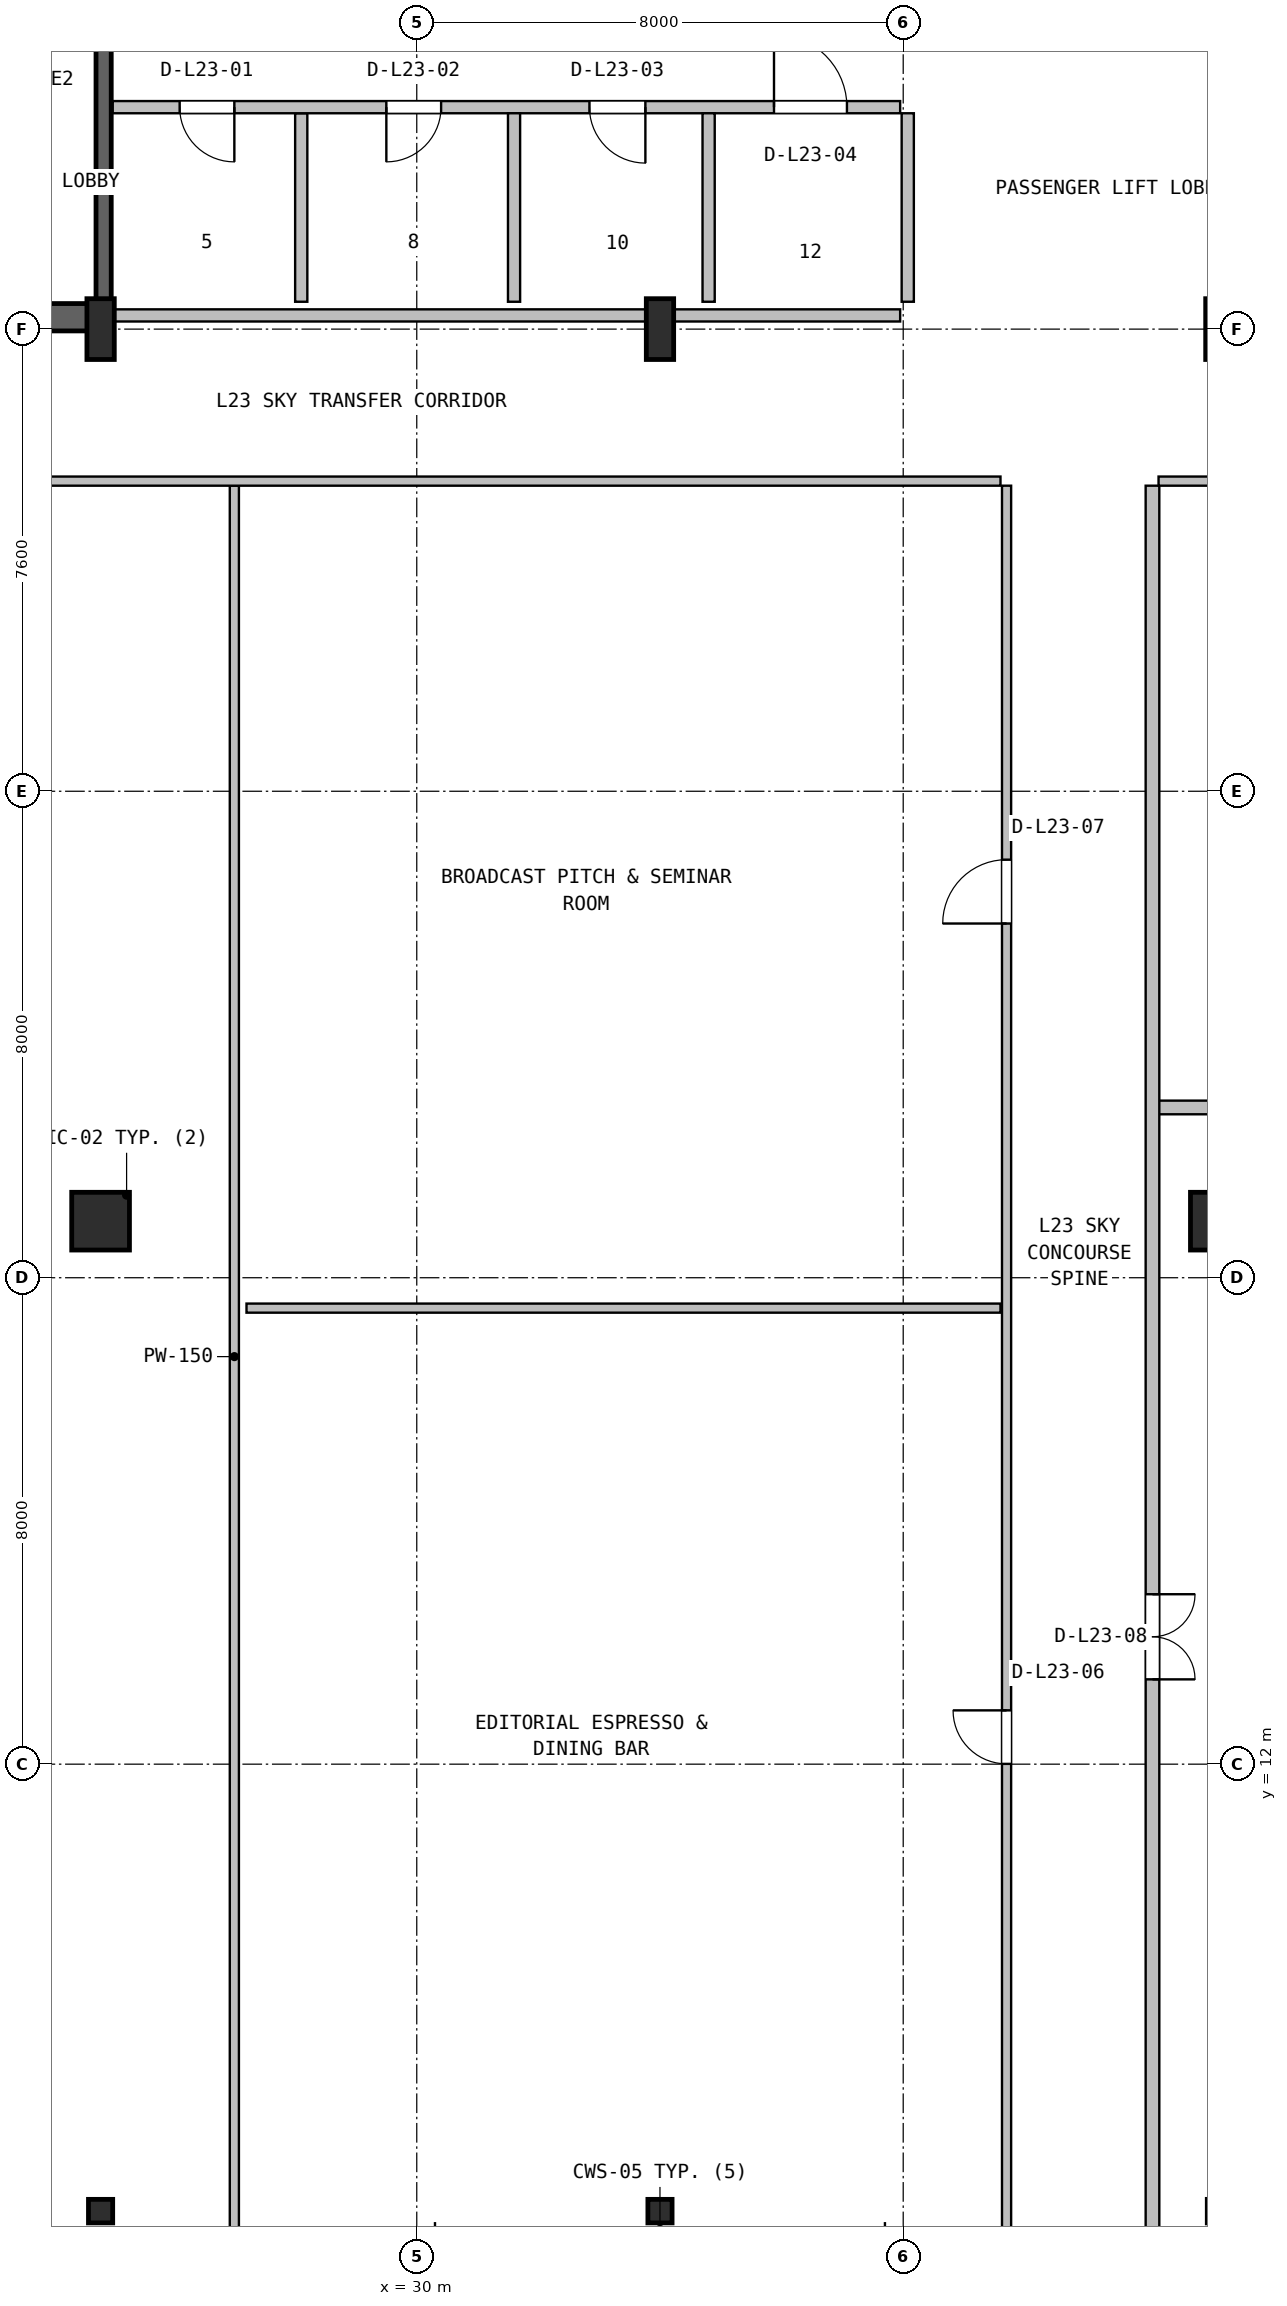
"""IFC4 building model, lengths in metres.
Left out: names, types, materials, properties, quantities, classifications, styles, units other than length and angle.
Written with IfcOpenShell. Run it as: python <this file> out.ifc"""

import sys

from ifc_helpers import new_model, si_unit, direction, frame, frame_2d, origin, origin_2d, place, context, subcontext, project, spatial, rectangle, i_section, extrude, source, transform, mapped, element, fill, save


model = new_model("IFC4")
c1 = context("Model", 3, precision=1e-05, world=origin(), true_north=direction((0.0, 1.0)))
c2 = subcontext(c1, "Body", "Model", "MODEL_VIEW")
j1 = project(units=[si_unit("LENGTHUNIT", "METRE"), si_unit("PLANEANGLEUNIT", "RADIAN")], contexts=[c1])
p1 = place(None, origin())
s1 = spatial("IfcSite", under=j1, at=p1, CompositionType="ELEMENT")
p2 = place(p1, origin())
s2 = spatial("IfcBuilding", under=s1, at=p2, CompositionType="ELEMENT")
p3 = place(p2, frame((0.0, 0.0, 98.4)))
s3 = spatial("IfcBuildingStorey", under=s2, at=p3, CompositionType="ELEMENT", Elevation=98.4)
p4 = place(p3, frame((15.57, 35.795, 0.0), z_axis=(0.0, 0.0, 1.0), x_axis=(1.0, 0.0, 0.0)))
e1 = element("IfcWall", 1, at=p4, inside=s3, PredefinedType="SHEAR", context=c2, shape_type="SweptSolid", body=[
    extrude(rectangle(XDim=9.23, YDim=0.45, at=frame_2d((4.615, 0.0))), origin(), (0.0, 0.0, 1.0), 4.35),
])
p5 = place(p4, frame((5.4, 0.0, 0.0)))
e2 = element("IfcOpeningElement", 2, at=p5, cuts=e1, PredefinedType="OPENING", context=c2, shape_type="SweptSolid", body=[
    extrude(rectangle(XDim=1.0, YDim=2.1, at=frame_2d((0.5, 1.05))), frame((0.0, 0.235, 0.0), z_axis=(0.0, -1.0, 0.0), x_axis=(1.0, 0.0, 0.0)), (0.0, 0.0, 1.0), 0.47),
])
m1 = source(origin(), c2, "Body", "SweptSolid", [
    extrude(i_section(OverallWidth=0.45, OverallDepth=1.0, WebThickness=0.016, FlangeThickness=0.03, FilletRadius=0.016, at=origin_2d()), origin(), (0.0, 0.0, 1.0), 4.6),
])
for number, where, z_axis, x_axis in (
    (3, (24.8, 35.6, 0.0), (0.0, 0.0, 1.0), (1.0, 0.0, 0.0)),
    (4, (34.0, 35.6, 0.0), (0.0, 0.0, 1.0), (1.0, 0.0, 0.0)),
    (5, (43.2, 35.6, 0.0), (0.0, 0.0, 1.0), (1.0, 0.0, 0.0)),
):
    element("IfcColumn", number, at=place(p3, frame(where, z_axis=z_axis, x_axis=x_axis)), inside=s3, PredefinedType="COLUMN", context=c2, shape_type="MappedRepresentation", body=[
        mapped(m1, transform((0.0, 0.0, 0.0), x_axis=(1.0, 0.0, 0.0), y_axis=(0.0, 1.0, 0.0), z_axis=(0.0, 0.0, 1.0), scale=1.0)),
    ])
m2 = source(origin(), c2, "Body", "SweptSolid", [
    extrude(i_section(OverallWidth=0.398, OverallDepth=0.387, WebThickness=0.021, FlangeThickness=0.033, FilletRadius=0.018, at=origin_2d()), origin(), (0.0, 0.0, 1.0), 4.6),
])
for number, where, z_axis, x_axis in (
    (6, (24.8, 4.65, 0.0), (0.0, 0.0, 1.0), (1.0, 0.0, 0.0)),
    (7, (34.0, 4.65, 0.0), (0.0, 0.0, 1.0), (1.0, 0.0, 0.0)),
):
    element("IfcColumn", number, at=place(p3, frame(where, z_axis=z_axis, x_axis=x_axis)), inside=s3, PredefinedType="COLUMN", context=c2, shape_type="MappedRepresentation", body=[
        mapped(m2, transform((0.0, 0.0, 0.0), x_axis=(1.0, 0.0, 0.0), y_axis=(0.0, 1.0, 0.0), z_axis=(0.0, 0.0, 1.0), scale=1.0)),
    ])
m3 = source(origin(), c2, "Body", "SweptSolid", [
    extrude(rectangle(XDim=0.95, YDim=0.95, at=origin_2d()), origin(), (0.0, 0.0, 1.0), 4.6),
])
for number, where, z_axis, x_axis in (
    (8, (24.8, 20.93, 0.0), (0.0, 0.0, 1.0), (1.0, 0.0, 0.0)),
    (9, (43.2, 20.93, 0.0), (0.0, 0.0, 1.0), (1.0, 0.0, 0.0)),
):
    element("IfcColumn", number, at=place(p3, frame(where, z_axis=z_axis, x_axis=x_axis)), inside=s3, PredefinedType="COLUMN", context=c2, shape_type="MappedRepresentation", body=[
        mapped(m3, transform((0.0, 0.0, 0.0), x_axis=(1.0, 0.0, 0.0), y_axis=(0.0, 1.0, 0.0), z_axis=(0.0, 0.0, 1.0), scale=1.0)),
    ])
p6 = place(p3, frame((24.85, 36.05, 0.0), z_axis=(0.0, 0.0, 1.0), x_axis=(0.0, 1.0, 0.0)))
e10 = element("IfcWall", 10, at=p6, inside=s3, PredefinedType="SHEAR", context=c2, shape_type="SweptSolid", body=[
    extrude(rectangle(XDim=10.45, YDim=0.25, at=frame_2d((5.225, 0.0))), origin(), (0.0, 0.0, 1.0), 4.35),
])
p7 = place(p3, frame((25.0, 35.825, 0.0), z_axis=(0.0, 0.0, 1.0), x_axis=(1.0, 0.0, 0.0)))
e11 = element("IfcWall", 11, at=p7, inside=s3, PredefinedType="SOLIDWALL", context=c2, shape_type="SweptSolid", body=[
    extrude(rectangle(XDim=12.95, YDim=0.2, at=frame_2d((6.475, 0.0))), origin(), (0.0, 0.0, 1.0), 3.125),
])
p8 = place(p3, frame((28.1, 36.05, 0.0), z_axis=(0.0, 0.0, 1.0), x_axis=(0.0, 1.0, 0.0)))
e12 = element("IfcWall", 12, at=p8, inside=s3, PredefinedType="PLUMBINGWALL", context=c2, shape_type="SweptSolid", body=[
    extrude(rectangle(XDim=3.1, YDim=0.2, at=frame_2d((1.55, 0.0))), origin(), (0.0, 0.0, 1.0), 4.33),
])
p9 = place(p3, frame((25.0, 39.25, 0.0), z_axis=(0.0, 0.0, 1.0), x_axis=(1.0, 0.0, 0.0)))
e13 = element("IfcWall", 13, at=p9, inside=s3, PredefinedType="SOLIDWALL", context=c2, shape_type="SweptSolid", body=[
    extrude(rectangle(XDim=12.95, YDim=0.2, at=frame_2d((6.475, 0.0))), origin(), (0.0, 0.0, 1.0), 4.33),
])
p10 = place(p9, frame((1.1, 0.0, 0.0)))
e14 = element("IfcOpeningElement", 14, at=p10, cuts=e13, PredefinedType="OPENING", context=c2, shape_type="SweptSolid", body=[
    extrude(rectangle(XDim=0.9, YDim=2.06, at=frame_2d((0.45, 1.03))), frame((0.0, 0.11, 0.0), z_axis=(0.0, -1.0, 0.0), x_axis=(1.0, 0.0, 0.0)), (0.0, 0.0, 1.0), 0.22),
])
p11 = place(p9, frame((4.5, 0.0, 0.0)))
e15 = element("IfcOpeningElement", 15, at=p11, cuts=e13, PredefinedType="OPENING", context=c2, shape_type="SweptSolid", body=[
    extrude(rectangle(XDim=0.9, YDim=2.06, at=frame_2d((0.45, 1.03))), frame((0.0, 0.11, 0.0), z_axis=(0.0, -1.0, 0.0), x_axis=(1.0, 0.0, 0.0)), (0.0, 0.0, 1.0), 0.22),
])
p12 = place(p9, frame((7.84, 0.0, 0.0)))
e16 = element("IfcOpeningElement", 16, at=p12, cuts=e13, PredefinedType="OPENING", context=c2, shape_type="SweptSolid", body=[
    extrude(rectangle(XDim=0.92, YDim=2.08, at=frame_2d((0.46, 1.04))), frame((0.0, 0.11, 0.0), z_axis=(0.0, -1.0, 0.0), x_axis=(1.0, 0.0, 0.0)), (0.0, 0.0, 1.0), 0.22),
])
p13 = place(p9, frame((10.875, 0.0, 0.0)))
e17 = element("IfcOpeningElement", 17, at=p13, cuts=e13, PredefinedType="OPENING", context=c2, shape_type="SweptSolid", body=[
    extrude(rectangle(XDim=1.2, YDim=2.1, at=frame_2d((0.6, 1.05))), frame((0.0, 0.11, 0.0), z_axis=(0.0, -1.0, 0.0), x_axis=(1.0, 0.0, 0.0)), (0.0, 0.0, 1.0), 0.22),
])
p14 = place(p3, frame((31.6, 36.05, 0.0), z_axis=(0.0, 0.0, 1.0), x_axis=(0.0, 1.0, 0.0)))
e18 = element("IfcWall", 18, at=p14, inside=s3, PredefinedType="PLUMBINGWALL", context=c2, shape_type="SweptSolid", body=[
    extrude(rectangle(XDim=3.1, YDim=0.2, at=frame_2d((1.55, 0.0))), origin(), (0.0, 0.0, 1.0), 4.33),
])
for number, where, z_axis, x_axis in (
    (19, (34.8, 36.05, 0.0), (0.0, 0.0, 1.0), (0.0, 1.0, 0.0)),
    (20, (38.075, 36.05, 0.0), (0.0, 0.0, 1.0), (0.0, 1.0, 0.0)),
):
    element("IfcWall", number, at=place(p3, frame(where, z_axis=z_axis, x_axis=x_axis)), inside=s3, PredefinedType="SOLIDWALL", context=c2, shape_type="SweptSolid", body=[
        extrude(rectangle(XDim=3.1, YDim=0.2, at=frame_2d((1.55, 0.0))), origin(), (0.0, 0.0, 1.0), 4.33),
    ])
p15 = place(p3, frame((27.0, 4.38, 0.0), z_axis=(0.0, 0.0, 1.0), x_axis=(0.0, 1.0, 0.0)))
e21 = element("IfcWall", 21, at=p15, inside=s3, PredefinedType="PARTITIONING", context=c2, shape_type="SweptSolid", body=[
    extrude(rectangle(XDim=28.645, YDim=0.15, at=frame_2d((14.323, 0.0))), origin(), (0.0, 0.0, 1.0), 3.63),
])
p16 = place(p3, frame((4.68, 33.1, 0.0), z_axis=(0.0, 0.0, 1.0), x_axis=(1.0, 0.0, 0.0)))
e22 = element("IfcWall", 22, at=p16, inside=s3, PredefinedType="PARTITIONING", context=c2, shape_type="SweptSolid", body=[
    extrude(rectangle(XDim=34.92, YDim=0.15, at=frame_2d((17.46, 0.0))), origin(), (0.0, 0.0, 1.0), 3.63),
])
p17 = place(p16, frame((12.32, 0.0, 0.0)))
e23 = element("IfcOpeningElement", 23, at=p17, cuts=e22, PredefinedType="OPENING", context=c2, shape_type="SweptSolid", body=[
    extrude(rectangle(XDim=1.55, YDim=2.12, at=frame_2d((0.775, 1.06))), frame((0.0, 0.085, 0.0), z_axis=(0.0, -1.0, 0.0), x_axis=(1.0, 0.0, 0.0)), (0.0, 0.0, 1.0), 0.17),
])
p18 = place(p3, frame((39.7, 4.38, 0.0), z_axis=(0.0, 0.0, 1.0), x_axis=(0.0, 1.0, 0.0)))
e24 = element("IfcWall", 24, at=p18, inside=s3, PredefinedType="PARTITIONING", context=c2, shape_type="SweptSolid", body=[
    extrude(rectangle(XDim=28.645, YDim=0.15, at=frame_2d((14.323, 0.0))), origin(), (0.0, 0.0, 1.0), 3.63),
])
p19 = place(p18, frame((7.625, 0.0, 0.0)))
e25 = element("IfcOpeningElement", 25, at=p19, cuts=e24, PredefinedType="OPENING", context=c2, shape_type="SweptSolid", body=[
    extrude(rectangle(XDim=0.88, YDim=2.06, at=frame_2d((0.44, 1.03))), frame((0.0, 0.085, 0.0), z_axis=(0.0, -1.0, 0.0), x_axis=(1.0, 0.0, 0.0)), (0.0, 0.0, 1.0), 0.17),
])
p20 = place(p18, frame((21.445, 0.0, 0.0)))
e26 = element("IfcOpeningElement", 26, at=p20, cuts=e24, PredefinedType="OPENING", context=c2, shape_type="SweptSolid", body=[
    extrude(rectangle(XDim=1.05, YDim=2.1, at=frame_2d((0.525, 1.05))), frame((0.0, 0.085, 0.0), z_axis=(0.0, -1.0, 0.0), x_axis=(1.0, 0.0, 0.0)), (0.0, 0.0, 1.0), 0.17),
])
p21 = place(p3, frame((27.2, 19.5, 0.0), z_axis=(0.0, 0.0, 1.0), x_axis=(1.0, 0.0, 0.0)))
e27 = element("IfcWall", 27, at=p21, inside=s3, PredefinedType="PARTITIONING", context=c2, shape_type="SweptSolid", body=[
    extrude(rectangle(XDim=12.4, YDim=0.15, at=frame_2d((6.2, 0.0))), origin(), (0.0, 0.0, 1.0), 3.63),
])
p22 = place(p3, frame((42.2, 22.8, 0.0), z_axis=(0.0, 0.0, 1.0), x_axis=(1.0, 0.0, 0.0)))
e28 = element("IfcWall", 28, at=p22, inside=s3, PredefinedType="PARTITIONING", context=c2, shape_type="SweptSolid", body=[
    extrude(rectangle(XDim=21.12, YDim=0.225, at=frame_2d((10.56, 0.0))), origin(), (0.0, 0.0, 1.0), 3.63),
])
p23 = place(p3, frame((42.1, 4.38, 0.0), z_axis=(0.0, 0.0, 1.0), x_axis=(0.0, 1.0, 0.0)))
e29 = element("IfcWall", 29, at=p23, inside=s3, PredefinedType="PARTITIONING", context=c2, shape_type="SweptSolid", body=[
    extrude(rectangle(XDim=28.645, YDim=0.225, at=frame_2d((14.323, 0.0))), origin(), (0.0, 0.0, 1.0), 3.63),
])
p24 = place(p23, frame((9.015, 0.0, 0.0)))
e30 = element("IfcOpeningElement", 30, at=p24, cuts=e29, PredefinedType="OPENING", context=c2, shape_type="SweptSolid", body=[
    extrude(rectangle(XDim=1.4, YDim=2.12, at=frame_2d((0.7, 1.06))), frame((0.0, 0.123, 0.0), z_axis=(0.0, -1.0, 0.0), x_axis=(1.0, 0.0, 0.0)), (0.0, 0.0, 1.0), 0.245),
])
p25 = place(p3, frame((42.2, 33.1, 0.0), z_axis=(0.0, 0.0, 1.0), x_axis=(1.0, 0.0, 0.0)))
e31 = element("IfcWall", 31, at=p25, inside=s3, PredefinedType="PARTITIONING", context=c2, shape_type="SweptSolid", body=[
    extrude(rectangle(XDim=21.12, YDim=0.15, at=frame_2d((10.56, 0.0))), origin(), (0.0, 0.0, 1.0), 3.63),
])
p26 = place(p25, frame((8.165, 0.0, 0.0)))
e32 = element("IfcOpeningElement", 32, at=p26, cuts=e31, PredefinedType="OPENING", context=c2, shape_type="SweptSolid", body=[
    extrude(rectangle(XDim=0.92, YDim=2.08, at=frame_2d((0.46, 1.04))), frame((0.0, 0.085, 0.0), z_axis=(0.0, -1.0, 0.0), x_axis=(1.0, 0.0, 0.0)), (0.0, 0.0, 1.0), 0.17),
])
m4 = source(origin(), c2, "Body", "SweptSolid", [
    extrude(rectangle(XDim=0.9, YDim=2.06, at=frame_2d((0.45, 1.03))), frame((0.0, 0.025, 0.0), z_axis=(0.0, -1.0, 0.0), x_axis=(1.0, 0.0, 0.0)), (0.0, 0.0, 1.0), 0.05),
])
p27 = place(p10, frame((0.9, 0.0, 0.0), z_axis=(0.0, 0.0, 1.0), x_axis=(-1.0, 0.0, 0.0)))
e33 = element("IfcDoor", 33, at=p27, inside=s3, OperationType="SINGLE_SWING_RIGHT", PredefinedType="DOOR", context=c2, shape_type="MappedRepresentation", body=[
    mapped(m4, transform((0.0, 0.0, 0.0), x_axis=(1.0, 0.0, 0.0), y_axis=(0.0, 1.0, 0.0), z_axis=(0.0, 0.0, 1.0), scale=1.0)),
])
fill(e14, e33)
p28 = place(p11, frame((0.9, 0.0, 0.0), z_axis=(0.0, 0.0, 1.0), x_axis=(-1.0, 0.0, 0.0)))
e34 = element("IfcDoor", 34, at=p28, inside=s3, OperationType="SINGLE_SWING_LEFT", PredefinedType="DOOR", context=c2, shape_type="MappedRepresentation", body=[
    mapped(m4, transform((0.0, 0.0, 0.0), x_axis=(1.0, 0.0, 0.0), y_axis=(0.0, 1.0, 0.0), z_axis=(0.0, 0.0, 1.0), scale=1.0)),
])
fill(e15, e34)
m5 = source(origin(), c2, "Body", "SweptSolid", [
    extrude(rectangle(XDim=0.92, YDim=2.08, at=frame_2d((0.46, 1.04))), frame((0.0, 0.025, 0.0), z_axis=(0.0, -1.0, 0.0), x_axis=(1.0, 0.0, 0.0)), (0.0, 0.0, 1.0), 0.05),
])
p29 = place(p12, frame((0.92, 0.0, 0.0), z_axis=(0.0, 0.0, 1.0), x_axis=(-1.0, 0.0, 0.0)))
e35 = element("IfcDoor", 35, at=p29, inside=s3, OperationType="SINGLE_SWING_RIGHT", PredefinedType="DOOR", context=c2, shape_type="MappedRepresentation", body=[
    mapped(m5, transform((0.0, 0.0, 0.0), x_axis=(1.0, 0.0, 0.0), y_axis=(0.0, 1.0, 0.0), z_axis=(0.0, 0.0, 1.0), scale=1.0)),
])
fill(e16, e35)
m6 = source(origin(), c2, "Body", "SweptSolid", [
    extrude(rectangle(XDim=1.2, YDim=2.1, at=frame_2d((0.6, 1.05))), frame((0.0, 0.025, 0.0), z_axis=(0.0, -1.0, 0.0), x_axis=(1.0, 0.0, 0.0)), (0.0, 0.0, 1.0), 0.05),
])
p30 = place(p13, origin())
e36 = element("IfcDoor", 36, at=p30, inside=s3, OperationType="SINGLE_SWING_LEFT", PredefinedType="DOOR", context=c2, shape_type="MappedRepresentation", body=[
    mapped(m6, transform((0.0, 0.0, 0.0), x_axis=(1.0, 0.0, 0.0), y_axis=(0.0, 1.0, 0.0), z_axis=(0.0, 0.0, 1.0), scale=1.0)),
])
fill(e17, e36)
m7 = source(origin(), c2, "Body", "SweptSolid", [
    extrude(rectangle(XDim=0.88, YDim=2.06, at=frame_2d((0.44, 1.03))), frame((0.0, 0.025, 0.0), z_axis=(0.0, -1.0, 0.0), x_axis=(1.0, 0.0, 0.0)), (0.0, 0.0, 1.0), 0.05),
])
p31 = place(p19, origin())
e37 = element("IfcDoor", 37, at=p31, inside=s3, OperationType="SINGLE_SWING_RIGHT", PredefinedType="DOOR", context=c2, shape_type="MappedRepresentation", body=[
    mapped(m7, transform((0.0, 0.0, 0.0), x_axis=(1.0, 0.0, 0.0), y_axis=(0.0, 1.0, 0.0), z_axis=(0.0, 0.0, 1.0), scale=1.0)),
])
fill(e25, e37)
m8 = source(origin(), c2, "Body", "SweptSolid", [
    extrude(rectangle(XDim=1.05, YDim=2.1, at=frame_2d((0.525, 1.05))), frame((0.0, 0.025, 0.0), z_axis=(0.0, -1.0, 0.0), x_axis=(1.0, 0.0, 0.0)), (0.0, 0.0, 1.0), 0.05),
])
p32 = place(p20, origin())
e38 = element("IfcDoor", 38, at=p32, inside=s3, OperationType="SINGLE_SWING_LEFT", PredefinedType="DOOR", context=c2, shape_type="MappedRepresentation", body=[
    mapped(m8, transform((0.0, 0.0, 0.0), x_axis=(1.0, 0.0, 0.0), y_axis=(0.0, 1.0, 0.0), z_axis=(0.0, 0.0, 1.0), scale=1.0)),
])
fill(e26, e38)
m9 = source(origin(), c2, "Body", "SweptSolid", [
    extrude(rectangle(XDim=1.4, YDim=2.12, at=frame_2d((0.7, 1.06))), frame((0.0, 0.025, 0.0), z_axis=(0.0, -1.0, 0.0), x_axis=(1.0, 0.0, 0.0)), (0.0, 0.0, 1.0), 0.05),
])
p33 = place(p24, frame((1.4, 0.0, 0.0), z_axis=(0.0, 0.0, 1.0), x_axis=(-1.0, 0.0, 0.0)))
e39 = element("IfcDoor", 39, at=p33, inside=s3, OperationType="DOUBLE_DOOR_SINGLE_SWING", PredefinedType="DOOR", context=c2, shape_type="MappedRepresentation", body=[
    mapped(m9, transform((0.0, 0.0, 0.0), x_axis=(1.0, 0.0, 0.0), y_axis=(0.0, 1.0, 0.0), z_axis=(0.0, 0.0, 1.0), scale=1.0)),
])
fill(e30, e39)
save(model, sys.argv[1])
